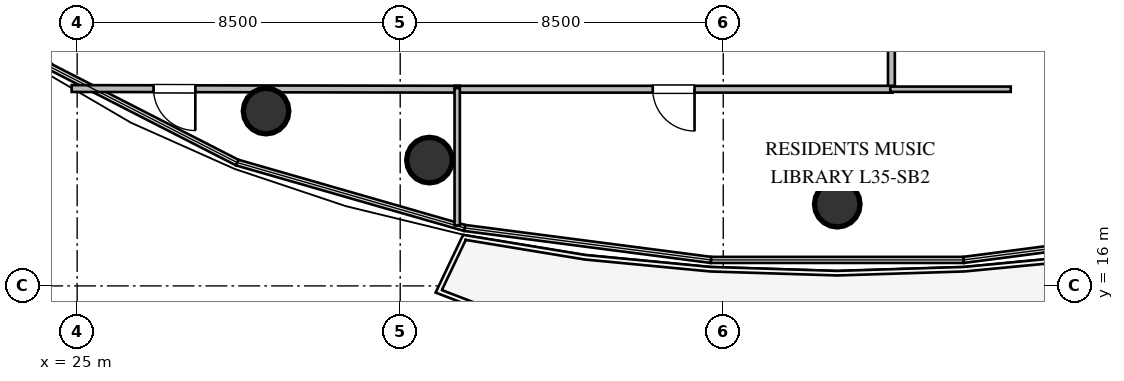
"""IFC4 building model, lengths in metres.
Left out: names, types, materials, properties, quantities, classifications, styles, units other than length and angle.
Written with IfcOpenShell. Run it as: python <this file> out.ifc"""

import sys

from ifc_helpers import new_model, si_unit, direction, frame, frame_2d, origin, origin_2d, place, context, subcontext, project, spatial, rectangle, circle, extrude, element, fill, save


model = new_model("IFC4")
c1 = context("Model", 3, precision=1e-05, world=origin(), true_north=direction((0.0, 1.0)))
c2 = subcontext(c1, "Body", "Model", "MODEL_VIEW")
j1 = project(units=[si_unit("LENGTHUNIT", "METRE"), si_unit("PLANEANGLEUNIT", "RADIAN")], contexts=[c1])
p1 = place(None, origin())
s1 = spatial("IfcSite", under=j1, at=p1, CompositionType="ELEMENT")
p2 = place(p1, origin())
s2 = spatial("IfcBuilding", under=s1, at=p2, CompositionType="ELEMENT")
p3 = place(p2, frame((0.0, 0.0, 135.0)))
s3 = spatial("IfcBuildingStorey", under=s2, at=p3, CompositionType="ELEMENT", Elevation=135.0)
for number, where, z_axis, x_axis in (
    (1, (29.97, 20.6, 0.0), (0.0, 0.0, 1.0), (1.0, 0.0, 0.0)),
    (2, (34.27, 19.31, 0.0), (0.0, 0.0, 1.0), (1.0, 0.0, 0.0)),
    (3, (45.0, 18.15, 0.0), (0.0, 0.0, 1.0), (1.0, 0.0, 0.0)),
):
    element("IfcColumn", number, at=place(p3, frame(where, z_axis=z_axis, x_axis=x_axis)), inside=s3, PredefinedType="COLUMN", context=c2, shape_type="SweptSolid", body=[
        extrude(circle(Radius=0.6, at=origin_2d()), origin(), (0.0, 0.0, 1.0), 3.6),
    ])
p4 = place(p3, frame((46.425, 25.405, 0.0), z_axis=(0.0, 0.0, 1.0), x_axis=(0.0, -1.0, 0.0)))
e4 = element("IfcWall", 4, at=p4, inside=s3, PredefinedType="PARTITIONING", context=c2, shape_type="SweptSolid", body=[
    extrude(rectangle(XDim=4.26, YDim=0.18, at=frame_2d((2.13, 0.0))), origin(), (0.0, 0.0, 1.0), 3.36),
])
p5 = place(p4, frame((1.53, 0.0, 0.0)))
e5 = element("IfcOpeningElement", 5, at=p5, cuts=e4, PredefinedType="OPENING", context=c2, shape_type="SweptSolid", body=[
    extrude(rectangle(XDim=1.2, YDim=2.15, at=frame_2d((0.6, 1.075))), frame((0.0, 0.1, 0.0), z_axis=(0.0, -1.0, 0.0), x_axis=(1.0, 0.0, 0.0)), (0.0, 0.0, 1.0), 0.2),
])
p6 = place(p3, frame((35.065, 21.175, 0.0), z_axis=(0.0, 0.0, 1.0), x_axis=(-0.999998434459, 0.001769485513, 0.0)))
e6 = element("IfcWall", 6, at=p6, inside=s3, PredefinedType="PARTITIONING", context=c2, shape_type="SweptSolid", body=[
    extrude(rectangle(XDim=10.21, YDim=0.18, at=frame_2d((5.105, 0.0))), origin(), (0.0, 0.0, 1.0), 2.657),
])
p7 = place(p6, frame((6.955, 0.0, 0.0)))
e7 = element("IfcOpeningElement", 7, at=p7, cuts=e6, PredefinedType="OPENING", context=c2, shape_type="SweptSolid", body=[
    extrude(rectangle(XDim=1.1, YDim=2.1, at=frame_2d((0.55, 1.05))), frame((0.0, 0.1, 0.0), z_axis=(0.0, -1.0, 0.0), x_axis=(1.0, 0.0, 0.0)), (0.0, 0.0, 1.0), 0.2),
])
p8 = place(p3, frame((46.455, 21.175, 0.0), z_axis=(0.0, 0.0, 1.0), x_axis=(-1.0, 0.0, 0.0)))
e8 = element("IfcWall", 8, at=p8, inside=s3, PredefinedType="PARTITIONING", context=c2, shape_type="SweptSolid", body=[
    extrude(rectangle(XDim=11.52, YDim=0.18, at=frame_2d((5.76, 0.0))), origin(), (0.0, 0.0, 1.0), 2.996),
])
p9 = place(p8, frame((5.21, 0.0, 0.0)))
e9 = element("IfcOpeningElement", 9, at=p9, cuts=e8, PredefinedType="OPENING", context=c2, shape_type="SweptSolid", body=[
    extrude(rectangle(XDim=1.1, YDim=2.1, at=frame_2d((0.55, 1.05))), frame((0.0, 0.1, 0.0), z_axis=(0.0, -1.0, 0.0), x_axis=(1.0, 0.0, 0.0)), (0.0, 0.0, 1.0), 0.2),
])
p10 = place(p3, frame((49.565, 21.175, 0.0), z_axis=(0.0, 0.0, 1.0), x_axis=(-1.0, 0.0, 0.0)))
e10 = element("IfcWall", 10, at=p10, inside=s3, PredefinedType="PARTITIONING", context=c2, shape_type="SweptSolid", body=[
    extrude(rectangle(XDim=3.17, YDim=0.14, at=frame_2d((1.585, 0.0))), origin(), (0.0, 0.0, 1.0), 2.996),
])
p11 = place(p3, frame((35.0, 21.205, 0.0), z_axis=(0.0, 0.0, 1.0), x_axis=(0.0, -1.0, 0.0)))
e11 = element("IfcWall", 11, at=p11, inside=s3, PredefinedType="PARTITIONING", context=c2, shape_type="SweptSolid", body=[
    extrude(rectangle(XDim=3.614, YDim=0.14, at=frame_2d((1.807, 0.0))), origin(), (0.0, 0.0, 1.0), 3.36),
])
p12 = place(p7, origin())
e12 = element("IfcDoor", 12, at=p12, inside=s3, OperationType="SINGLE_SWING_LEFT", PredefinedType="DOOR", context=c2, shape_type="SweptSolid", body=[
    extrude(rectangle(XDim=1.1, YDim=2.1, at=frame_2d((0.55, 1.05))), frame((0.0, 0.025, 0.0), z_axis=(0.0, -1.0, 0.0), x_axis=(1.0, 0.0, 0.0)), (0.0, 0.0, 1.0), 0.05),
])
fill(e7, e12)
p13 = place(p9, origin())
e13 = element("IfcDoor", 13, at=p13, inside=s3, OperationType="SINGLE_SWING_LEFT", PredefinedType="DOOR", context=c2, shape_type="SweptSolid", body=[
    extrude(rectangle(XDim=1.1, YDim=2.1, at=frame_2d((0.55, 1.05))), frame((0.0, 0.025, 0.0), z_axis=(0.0, -1.0, 0.0), x_axis=(1.0, 0.0, 0.0)), (0.0, 0.0, 1.0), 0.05),
])
fill(e9, e13)
save(model, sys.argv[1])
